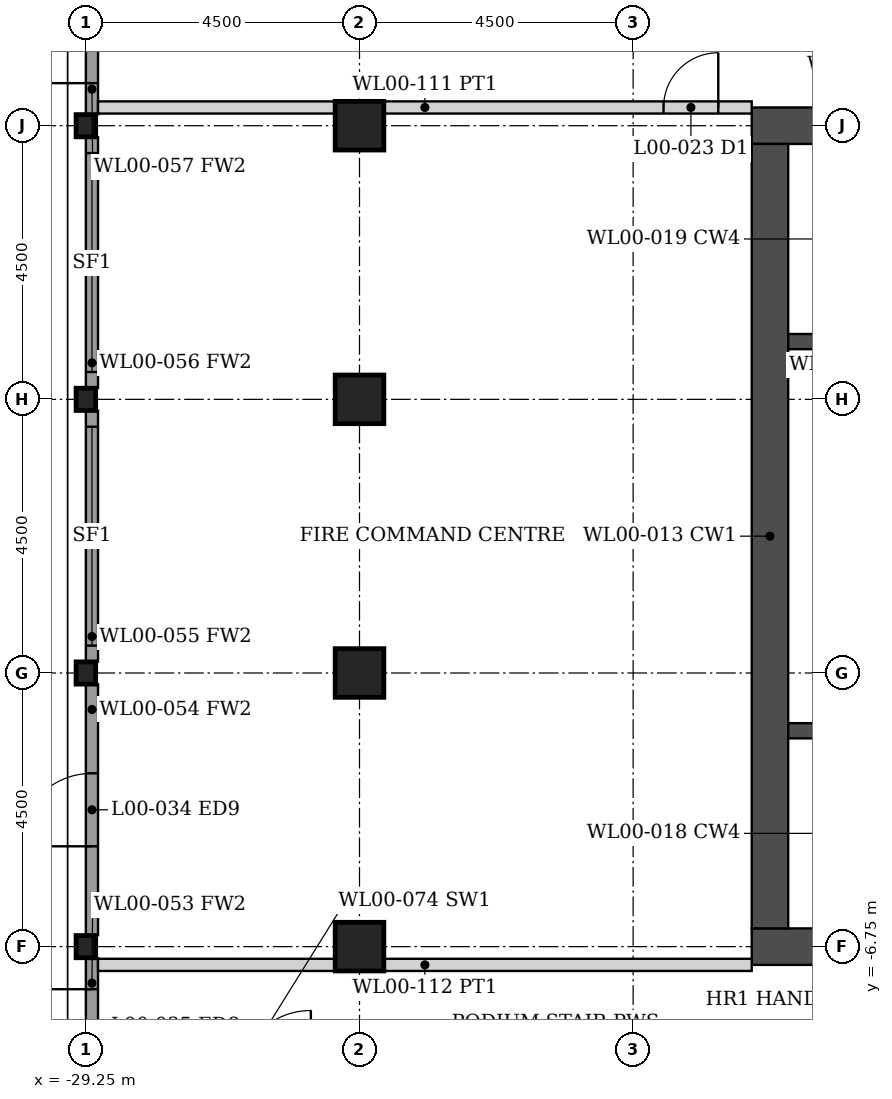
"""IFC4 building model, lengths in metres.
Left out: names, types, materials, properties, quantities, classifications, styles, units other than length and angle.
Written with IfcOpenShell. Run it as: python <this file> out.ifc"""

import sys

from ifc_helpers import new_model, si_unit, direction, frame, frame_2d, origin, origin_2d, place, context, subcontext, project, spatial, rectangle, hollow_rectangle, i_section, extrude, element, fill, save


model = new_model("IFC4")
c1 = context("Model", 3, precision=1e-05, world=origin(), true_north=direction((0.0, 1.0)))
c2 = subcontext(c1, "Body", "Model", "MODEL_VIEW")
j1 = project(units=[si_unit("LENGTHUNIT", "METRE"), si_unit("PLANEANGLEUNIT", "RADIAN")], contexts=[c1])
p1 = place(None, origin())
s1 = spatial("IfcSite", under=j1, at=p1, CompositionType="ELEMENT")
p2 = place(p1, origin())
s2 = spatial("IfcBuilding", under=s1, at=p2, CompositionType="ELEMENT")
p3 = place(p2, origin())
s3 = spatial("IfcBuildingStorey", under=s2, at=p3, CompositionType="ELEMENT", Elevation=0.0)
for number, where, z_axis, x_axis in (
    (1, (-24.75, -6.75, -0.3), (0.0, 0.0, 1.0), (1.0, 0.0, 0.0)),
    (2, (-24.75, -2.25, -0.3), (0.0, 0.0, 1.0), (1.0, 0.0, 0.0)),
    (3, (-24.75, 2.25, -0.3), (0.0, 0.0, 1.0), (1.0, 0.0, 0.0)),
    (4, (-24.75, 6.75, -0.3), (0.0, 0.0, 1.0), (1.0, 0.0, 0.0)),
):
    element("IfcColumn", number, at=place(p3, frame(where, z_axis=z_axis, x_axis=x_axis)), inside=s3, PredefinedType="COLUMN", context=c2, shape_type="SweptSolid", body=[
        extrude(hollow_rectangle(XDim=0.8, YDim=0.8, WallThickness=0.08, at=origin_2d()), origin(), (0.0, 0.0, 1.0), 6.3),
    ])
for number, where, z_axis, x_axis in (
    (5, (-29.25, -6.75, -0.3), (0.0, 0.0, 1.0), (1.0, 0.0, 0.0)),
    (6, (-29.25, -2.25, -0.3), (0.0, 0.0, 1.0), (1.0, 0.0, 0.0)),
    (7, (-29.25, 2.25, -0.3), (0.0, 0.0, 1.0), (1.0, 0.0, 0.0)),
    (8, (-29.25, 6.75, -0.3), (0.0, 0.0, 1.0), (1.0, 0.0, 0.0)),
):
    element("IfcColumn", number, at=place(p3, frame(where, z_axis=z_axis, x_axis=x_axis)), inside=s3, PredefinedType="COLUMN", context=c2, shape_type="SweptSolid", body=[
        extrude(i_section(OverallWidth=0.322, OverallDepth=0.365, WebThickness=0.027, FlangeThickness=0.044, FilletRadius=0.015, at=origin_2d()), origin(), (0.0, 0.0, 1.0), 6.3),
    ])
for number, where, z_axis, x_axis in (
    (9, (-8.7, -6.75, 0.0), (0.0, 0.0, 1.0), (-1.0, 0.0, 0.0)),
    (10, (-8.7, 6.75, 0.0), (0.0, 0.0, 1.0), (-1.0, 0.0, 0.0)),
):
    element("IfcWall", number, at=place(p3, frame(where, z_axis=z_axis, x_axis=x_axis)), inside=s3, PredefinedType="SHEAR", context=c2, shape_type="SweptSolid", body=[
        extrude(rectangle(XDim=9.6, YDim=0.6, at=frame_2d((4.8, 0.0))), origin(), (0.0, 0.0, 1.0), 6.0),
    ])
p4 = place(p3, frame((-18.0, -6.45, 0.0), z_axis=(0.0, 0.0, 1.0), x_axis=(0.0, 1.0, 0.0)))
e11 = element("IfcWall", 11, at=p4, inside=s3, PredefinedType="SHEAR", context=c2, shape_type="SweptSolid", body=[
    extrude(rectangle(XDim=12.9, YDim=0.6, at=frame_2d((6.45, 0.0))), origin(), (0.0, 0.0, 1.0), 6.0),
])
p5 = place(p3, frame((-9.3, -3.2, 0.0), z_axis=(0.0, 0.0, 1.0), x_axis=(-1.0, 0.0, 0.0)))
e12 = element("IfcWall", 12, at=p5, inside=s3, PredefinedType="SHEAR", context=c2, shape_type="SweptSolid", body=[
    extrude(rectangle(XDim=8.4, YDim=0.25, at=frame_2d((4.2, 0.0))), origin(), (0.0, 0.0, 1.0), 6.0),
])
p6 = place(p5, frame((0.15, 0.0, 0.0)))
e13 = element("IfcOpeningElement", 13, at=p6, cuts=e12, PredefinedType="OPENING", context=c2, shape_type="SweptSolid", body=[
    extrude(rectangle(XDim=1.0, YDim=2.1, at=frame_2d((0.5, 1.05))), frame((0.0, 0.135, 0.0), z_axis=(0.0, -1.0, 0.0), x_axis=(1.0, 0.0, 0.0)), (0.0, 0.0, 1.0), 0.27),
])
p7 = place(p3, frame((-9.3, 3.2, 0.0), z_axis=(0.0, 0.0, 1.0), x_axis=(-1.0, 0.0, 0.0)))
e14 = element("IfcWall", 14, at=p7, inside=s3, PredefinedType="SHEAR", context=c2, shape_type="SweptSolid", body=[
    extrude(rectangle(XDim=8.4, YDim=0.25, at=frame_2d((4.2, 0.0))), origin(), (0.0, 0.0, 1.0), 6.0),
])
p8 = place(p3, frame((-29.15, -11.062, 0.0), z_axis=(0.0, 0.0, 1.0), x_axis=(0.0, 1.0, 0.0)))
e15 = element("IfcWall", 15, at=p8, inside=s3, PredefinedType="SOLIDWALL", context=c2, shape_type="SweptSolid", body=[
    extrude(rectangle(XDim=4.125, YDim=0.2, at=frame_2d((2.062, 0.0))), origin(), (0.0, 0.0, 1.0), 5.133),
])
p9 = place(p8, frame((2.412, 0.0, 0.0)))
e16 = element("IfcOpeningElement", 16, at=p9, cuts=e15, PredefinedType="OPENING", context=c2, shape_type="SweptSolid", body=[
    extrude(rectangle(XDim=1.2, YDim=2.4, at=frame_2d((0.6, 1.2))), frame((0.0, 0.11, 0.0), z_axis=(0.0, -1.0, 0.0), x_axis=(1.0, 0.0, 0.0)), (0.0, 0.0, 1.0), 0.22),
])
p10 = place(p8, frame((0.012, 0.0, 0.15)))
e17 = element("IfcOpeningElement", 17, at=p10, cuts=e15, PredefinedType="OPENING", context=c2, shape_type="SweptSolid", body=[
    extrude(rectangle(XDim=1.6, YDim=4.833, at=frame_2d((0.8, 2.417))), frame((0.0, 0.11, 0.0), z_axis=(0.0, -1.0, 0.0), x_axis=(1.0, 0.0, 0.0)), (0.0, 0.0, 1.0), 0.22),
])
p11 = place(p3, frame((-29.15, -6.562, 0.0), z_axis=(0.0, 0.0, 1.0), x_axis=(0.0, 1.0, 0.0)))
e18 = element("IfcWall", 18, at=p11, inside=s3, PredefinedType="SOLIDWALL", context=c2, shape_type="SweptSolid", body=[
    extrude(rectangle(XDim=4.125, YDim=0.2, at=frame_2d((2.062, 0.0))), origin(), (0.0, 0.0, 1.0), 5.133),
])
p12 = place(p11, frame((1.462, 0.0, 0.0)))
e19 = element("IfcOpeningElement", 19, at=p12, cuts=e18, PredefinedType="OPENING", context=c2, shape_type="SweptSolid", body=[
    extrude(rectangle(XDim=1.2, YDim=2.4, at=frame_2d((0.6, 1.2))), frame((0.0, 0.11, 0.0), z_axis=(0.0, -1.0, 0.0), x_axis=(1.0, 0.0, 0.0)), (0.0, 0.0, 1.0), 0.22),
])
p13 = place(p3, frame((-29.15, -2.062, 0.0), z_axis=(0.0, 0.0, 1.0), x_axis=(0.0, 1.0, 0.0)))
e20 = element("IfcWall", 20, at=p13, inside=s3, PredefinedType="SOLIDWALL", context=c2, shape_type="SweptSolid", body=[
    extrude(rectangle(XDim=4.125, YDim=0.2, at=frame_2d((2.062, 0.0))), origin(), (0.0, 0.0, 1.0), 5.133),
])
p14 = place(p13, frame((0.262, 0.0, 0.15)))
e21 = element("IfcOpeningElement", 21, at=p14, cuts=e20, PredefinedType="OPENING", context=c2, shape_type="SweptSolid", body=[
    extrude(rectangle(XDim=3.6, YDim=4.833, at=frame_2d((1.8, 2.417))), frame((0.0, 0.11, 0.0), z_axis=(0.0, -1.0, 0.0), x_axis=(1.0, 0.0, 0.0)), (0.0, 0.0, 1.0), 0.22),
])
p15 = place(p3, frame((-29.15, 2.438, 0.0), z_axis=(0.0, 0.0, 1.0), x_axis=(0.0, 1.0, 0.0)))
e22 = element("IfcWall", 22, at=p15, inside=s3, PredefinedType="SOLIDWALL", context=c2, shape_type="SweptSolid", body=[
    extrude(rectangle(XDim=4.125, YDim=0.2, at=frame_2d((2.062, 0.0))), origin(), (0.0, 0.0, 1.0), 5.133),
])
p16 = place(p15, frame((0.262, 0.0, 0.15)))
e23 = element("IfcOpeningElement", 23, at=p16, cuts=e22, PredefinedType="OPENING", context=c2, shape_type="SweptSolid", body=[
    extrude(rectangle(XDim=3.6, YDim=4.833, at=frame_2d((1.8, 2.417))), frame((0.0, 0.11, 0.0), z_axis=(0.0, -1.0, 0.0), x_axis=(1.0, 0.0, 0.0)), (0.0, 0.0, 1.0), 0.22),
])
p17 = place(p3, frame((-29.15, 6.938, 0.0), z_axis=(0.0, 0.0, 1.0), x_axis=(0.0, 1.0, 0.0)))
e24 = element("IfcWall", 24, at=p17, inside=s3, PredefinedType="SOLIDWALL", context=c2, shape_type="SweptSolid", body=[
    extrude(rectangle(XDim=4.125, YDim=0.2, at=frame_2d((2.062, 0.0))), origin(), (0.0, 0.0, 1.0), 5.133),
])
p18 = place(p17, frame((0.512, 0.0, 0.0)))
e25 = element("IfcOpeningElement", 25, at=p18, cuts=e24, PredefinedType="OPENING", context=c2, shape_type="SweptSolid", body=[
    extrude(rectangle(XDim=1.2, YDim=2.4, at=frame_2d((0.6, 1.2))), frame((0.0, 0.11, 0.0), z_axis=(0.0, -1.0, 0.0), x_axis=(1.0, 0.0, 0.0)), (0.0, 0.0, 1.0), 0.22),
])
p19 = place(p17, frame((2.512, 0.0, 0.15)))
e26 = element("IfcOpeningElement", 26, at=p19, cuts=e24, PredefinedType="OPENING", context=c2, shape_type="SweptSolid", body=[
    extrude(rectangle(XDim=1.6, YDim=4.833, at=frame_2d((0.8, 2.417))), frame((0.0, 0.11, 0.0), z_axis=(0.0, -1.0, 0.0), x_axis=(1.0, 0.0, 0.0)), (0.0, 0.0, 1.0), 0.22),
])
p20 = place(p3, frame((-29.05, 7.05, 0.0), z_axis=(0.0, 0.0, 1.0), x_axis=(1.0, 0.0, 0.0)))
e27 = element("IfcWall", 27, at=p20, inside=s3, PredefinedType="PARTITIONING", context=c2, shape_type="SweptSolid", body=[
    extrude(rectangle(XDim=10.75, YDim=0.2, at=frame_2d((5.375, 0.0))), origin(), (0.0, 0.0, 1.0), 4.829),
])
p21 = place(p20, frame((9.3, 0.0, 0.0)))
e28 = element("IfcOpeningElement", 28, at=p21, cuts=e27, PredefinedType="OPENING", context=c2, shape_type="SweptSolid", body=[
    extrude(rectangle(XDim=0.9, YDim=2.1, at=frame_2d((0.45, 1.05))), frame((0.0, 0.11, 0.0), z_axis=(0.0, -1.0, 0.0), x_axis=(1.0, 0.0, 0.0)), (0.0, 0.0, 1.0), 0.22),
])
p22 = place(p3, frame((-29.05, -7.05, 0.0), z_axis=(0.0, 0.0, 1.0), x_axis=(1.0, 0.0, 0.0)))
e29 = element("IfcWall", 29, at=p22, inside=s3, PredefinedType="PARTITIONING", context=c2, shape_type="SweptSolid", body=[
    extrude(rectangle(XDim=10.75, YDim=0.2, at=frame_2d((5.375, 0.0))), origin(), (0.0, 0.0, 1.0), 4.829),
])
p23 = place(p9, origin())
e30 = element("IfcDoor", 30, at=p23, inside=s3, OperationType="SINGLE_SWING_RIGHT", PredefinedType="DOOR", context=c2, shape_type="SweptSolid", body=[
    extrude(rectangle(XDim=1.2, YDim=2.4, at=frame_2d((0.6, 1.2))), frame((0.0, 0.025, 0.0), z_axis=(0.0, -1.0, 0.0), x_axis=(1.0, 0.0, 0.0)), (0.0, 0.0, 1.0), 0.05),
])
fill(e16, e30)
p24 = place(p12, origin())
e31 = element("IfcDoor", 31, at=p24, inside=s3, OperationType="SINGLE_SWING_LEFT", PredefinedType="DOOR", context=c2, shape_type="SweptSolid", body=[
    extrude(rectangle(XDim=1.2, YDim=2.4, at=frame_2d((0.6, 1.2))), frame((0.0, 0.025, 0.0), z_axis=(0.0, -1.0, 0.0), x_axis=(1.0, 0.0, 0.0)), (0.0, 0.0, 1.0), 0.05),
])
fill(e19, e31)
p25 = place(p14, origin())
e32 = element("IfcWindow", 32, at=p25, inside=s3, PartitioningType="SINGLE_PANEL", PredefinedType="WINDOW", context=c2, shape_type="SweptSolid", body=[
    extrude(rectangle(XDim=3.6, YDim=4.833, at=frame_2d((1.8, 2.417))), frame((0.0, 0.03, 0.0), z_axis=(0.0, -1.0, 0.0), x_axis=(1.0, 0.0, 0.0)), (0.0, 0.0, 1.0), 0.06),
])
fill(e21, e32)
p26 = place(p16, origin())
e33 = element("IfcWindow", 33, at=p26, inside=s3, PartitioningType="SINGLE_PANEL", PredefinedType="WINDOW", context=c2, shape_type="SweptSolid", body=[
    extrude(rectangle(XDim=3.6, YDim=4.833, at=frame_2d((1.8, 2.417))), frame((0.0, 0.03, 0.0), z_axis=(0.0, -1.0, 0.0), x_axis=(1.0, 0.0, 0.0)), (0.0, 0.0, 1.0), 0.06),
])
fill(e23, e33)
p27 = place(p18, origin())
e34 = element("IfcDoor", 34, at=p27, inside=s3, OperationType="SINGLE_SWING_LEFT", PredefinedType="DOOR", context=c2, shape_type="SweptSolid", body=[
    extrude(rectangle(XDim=1.2, YDim=2.4, at=frame_2d((0.6, 1.2))), frame((0.0, 0.025, 0.0), z_axis=(0.0, -1.0, 0.0), x_axis=(1.0, 0.0, 0.0)), (0.0, 0.0, 1.0), 0.05),
])
fill(e25, e34)
p28 = place(p21, origin())
e35 = element("IfcDoor", 35, at=p28, inside=s3, OperationType="SINGLE_SWING_RIGHT", PredefinedType="DOOR", context=c2, shape_type="SweptSolid", body=[
    extrude(rectangle(XDim=0.9, YDim=2.1, at=frame_2d((0.45, 1.05))), frame((0.0, 0.025, 0.0), z_axis=(0.0, -1.0, 0.0), x_axis=(1.0, 0.0, 0.0)), (0.0, 0.0, 1.0), 0.05),
])
fill(e28, e35)
save(model, sys.argv[1])
